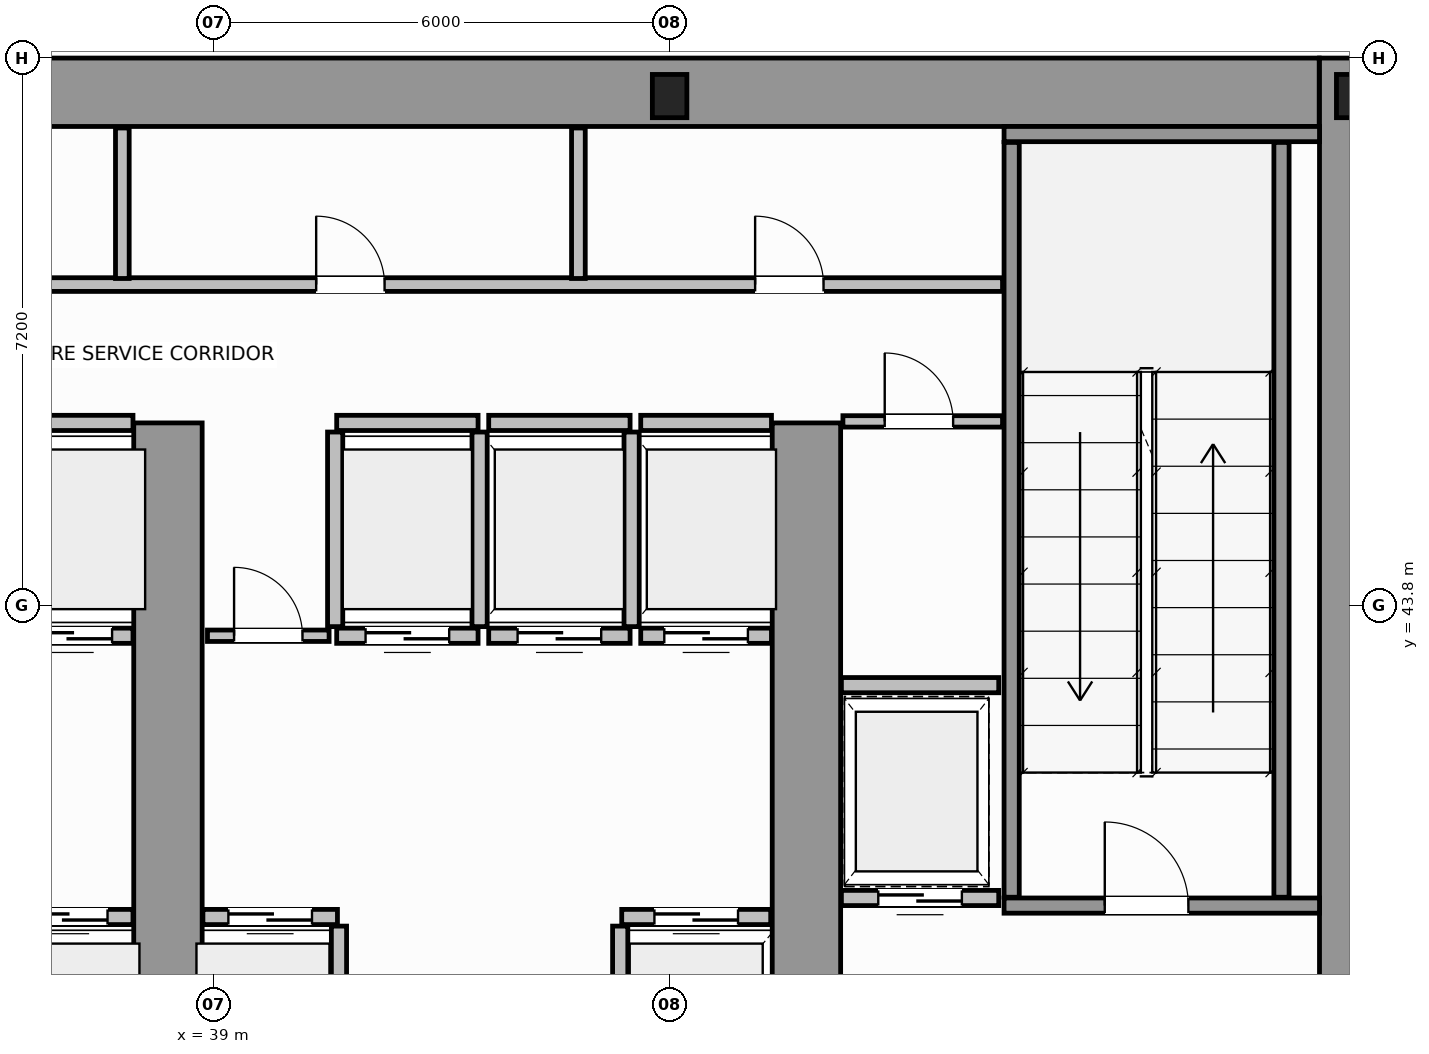
"""IFC4 building model, lengths in metres.
Left out: names, types, materials, properties, quantities, classifications, styles, units other than length and angle.
Written with IfcOpenShell. Run it as: python <this file> out.ifc"""

import sys

from ifc_helpers import new_model, si_unit, direction, frame, frame_2d, origin, origin_2d, place, context, subcontext, project, spatial, rectangle, i_section, extrude, source, transform, mapped, element, fill, save


model = new_model("IFC4")
c1 = context("Model", 3, precision=1e-05, world=origin(), true_north=direction((0.0, 1.0)))
c2 = subcontext(c1, "Body", "Model", "MODEL_VIEW")
j1 = project(units=[si_unit("LENGTHUNIT", "METRE"), si_unit("PLANEANGLEUNIT", "RADIAN")], contexts=[c1])
p1 = place(None, origin())
s1 = spatial("IfcSite", under=j1, at=p1, CompositionType="ELEMENT")
p2 = place(p1, origin())
s2 = spatial("IfcBuilding", under=s1, at=p2, CompositionType="ELEMENT")
p3 = place(p2, origin())
s3 = spatial("IfcBuildingStorey", under=s2, at=p3, CompositionType="ELEMENT", Elevation=0.0)
m1 = source(origin(), c2, "Body", "SweptSolid", [
    extrude(i_section(OverallWidth=0.454, OverallDepth=0.569, WebThickness=0.078, FlangeThickness=0.08, FilletRadius=0.015, at=origin_2d()), origin(), (0.0, 0.0, 1.0), 5.6),
])
for number, where, z_axis, x_axis in (
    (1, (45.0, 50.5, 0.0), (0.0, 0.0, 1.0), (1.0, 0.0, 0.0)),
    (2, (54.0, 50.5, 0.0), (0.0, 0.0, 1.0), (1.0, 0.0, 0.0)),
):
    element("IfcColumn", number, at=place(p3, frame(where, z_axis=z_axis, x_axis=x_axis)), inside=s3, PredefinedType="COLUMN", context=c2, shape_type="MappedRepresentation", body=[
        mapped(m1, transform((0.0, 0.0, 0.0), scale=1.0)),
    ])
p4 = place(p3, frame((34.002, 50.55, 0.0), z_axis=(0.0, 0.0, 1.0), x_axis=(1.0, 0.0, 0.0)))
e3 = element("IfcWall", 3, at=p4, inside=s3, PredefinedType="SHEAR", context=c2, shape_type="SweptSolid", body=[
    extrude(rectangle(XDim=19.544, YDim=0.9, at=frame_2d((9.772, 0.0))), origin(), (0.0, 0.0, 1.0), 5.6),
])
p5 = place(p3, frame((54.0, 36.5, 0.0), z_axis=(0.0, 0.0, 1.0), x_axis=(0.0, 1.0, 0.0)))
e4 = element("IfcWall", 4, at=p5, inside=s3, PredefinedType="SHEAR", context=c2, shape_type="SweptSolid", body=[
    extrude(rectangle(XDim=14.5, YDim=0.9, at=frame_2d((7.25, 0.0))), origin(), (0.0, 0.0, 1.0), 5.6),
])
for number, where, z_axis, x_axis in (
    (5, (38.4, 36.97, 0.0), (0.0, 0.0, 1.0), (0.0, 1.0, 0.0)),
    (6, (46.8, 36.97, 0.0), (0.0, 0.0, 1.0), (0.0, 1.0, 0.0)),
):
    element("IfcWall", number, at=place(p3, frame(where, z_axis=z_axis, x_axis=x_axis)), inside=s3, PredefinedType="SHEAR", context=c2, shape_type="SweptSolid", body=[
        extrude(rectangle(XDim=9.23, YDim=0.9, at=frame_2d((4.615, 0.0))), origin(), (0.0, 0.0, 1.0), 5.6),
    ])
p6 = place(p3, frame((49.4, 39.85, 0.0), z_axis=(0.0, 0.0, 1.0), x_axis=(1.0, 0.0, 0.0)))
e7 = element("IfcWall", 7, at=p6, inside=s3, PredefinedType="SOLIDWALL", context=c2, shape_type="SweptSolid", body=[
    extrude(rectangle(XDim=4.15, YDim=0.2, at=frame_2d((2.075, 0.0))), origin(), (0.0, 0.0, 1.0), 5.6),
])
p7 = place(p6, frame((1.325, 0.0, 0.0)))
e8 = element("IfcOpeningElement", 8, at=p7, cuts=e7, PredefinedType="OPENING", context=c2, shape_type="SweptSolid", body=[
    extrude(rectangle(XDim=1.1, YDim=2.15, at=frame_2d((0.55, 1.075))), frame((0.0, 0.11, 0.0), z_axis=(0.0, -1.0, 0.0), x_axis=(1.0, 0.0, 0.0)), (0.0, 0.0, 1.0), 0.22),
])
p8 = place(p3, frame((49.4, 50.0, 0.0), z_axis=(0.0, 0.0, 1.0), x_axis=(1.0, 0.0, 0.0)))
e9 = element("IfcWall", 9, at=p8, inside=s3, PredefinedType="SOLIDWALL", context=c2, shape_type="SweptSolid", body=[
    extrude(rectangle(XDim=4.15, YDim=0.2, at=frame_2d((2.075, 0.0))), origin(), (0.0, 0.0, 1.0), 5.6),
])
for number, where, z_axis, x_axis in (
    (10, (49.5, 39.96, 0.0), (0.0, 0.0, 1.0), (0.0, 1.0, 0.0)),
    (11, (53.05, 39.96, 0.0), (0.0, 0.0, 1.0), (0.0, 1.0, 0.0)),
):
    element("IfcWall", number, at=place(p3, frame(where, z_axis=z_axis, x_axis=x_axis)), inside=s3, PredefinedType="SOLIDWALL", context=c2, shape_type="SweptSolid", body=[
        extrude(rectangle(XDim=9.93, YDim=0.2, at=frame_2d((4.965, 0.0))), origin(), (0.0, 0.0, 1.0), 5.6),
    ])
p9 = place(p3, frame((36.17, 39.7, 0.0), z_axis=(0.0, 0.0, 1.0), x_axis=(1.0, 0.0, 0.0)))
e12 = element("IfcWall", 12, at=p9, inside=s3, PredefinedType="SOLIDWALL", context=c2, shape_type="SweptSolid", body=[
    extrude(rectangle(XDim=1.77, YDim=0.2, at=frame_2d((0.885, 0.0))), origin(), (0.0, 0.0, 1.0), 5.32),
])
p10 = place(p9, frame((0.335, 0.0, 0.0)))
e13 = element("IfcOpeningElement", 13, at=p10, cuts=e12, PredefinedType="OPENING", context=c2, shape_type="SweptSolid", body=[
    extrude(rectangle(XDim=1.1, YDim=2.15, at=frame_2d((0.55, 1.075))), frame((0.0, 0.11, 0.0), z_axis=(0.0, -1.0, 0.0), x_axis=(1.0, 0.0, 0.0)), (0.0, 0.0, 1.0), 0.22),
])
p11 = place(p3, frame((36.29, 43.4, 0.0), z_axis=(0.0, 0.0, 1.0), x_axis=(1.0, 0.0, 0.0)))
e14 = element("IfcWall", 14, at=p11, inside=s3, PredefinedType="SOLIDWALL", context=c2, shape_type="SweptSolid", body=[
    extrude(rectangle(XDim=1.65, YDim=0.2, at=frame_2d((0.825, 0.0))), origin(), (0.0, 0.0, 1.0), 5.32),
])
p12 = place(p11, frame((0.275, 0.0, 0.0)))
e15 = element("IfcOpeningElement", 15, at=p12, cuts=e14, PredefinedType="OPENING", context=c2, shape_type="SweptSolid", body=[
    extrude(rectangle(XDim=1.1, YDim=2.15, at=frame_2d((0.55, 1.075))), frame((0.0, 0.11, 0.0), z_axis=(0.0, -1.0, 0.0), x_axis=(1.0, 0.0, 0.0)), (0.0, 0.0, 1.0), 0.22),
])
p13 = place(p3, frame((36.29, 46.2, 0.0), z_axis=(0.0, 0.0, 1.0), x_axis=(1.0, 0.0, 0.0)))
e16 = element("IfcWall", 16, at=p13, inside=s3, PredefinedType="SOLIDWALL", context=c2, shape_type="SweptSolid", body=[
    extrude(rectangle(XDim=1.65, YDim=0.2, at=frame_2d((0.825, 0.0))), origin(), (0.0, 0.0, 1.0), 5.32),
])
p14 = place(p3, frame((38.86, 39.7, 0.0), z_axis=(0.0, 0.0, 1.0), x_axis=(1.0, 0.0, 0.0)))
e17 = element("IfcWall", 17, at=p14, inside=s3, PredefinedType="SOLIDWALL", context=c2, shape_type="SweptSolid", body=[
    extrude(rectangle(XDim=1.77, YDim=0.2, at=frame_2d((0.885, 0.0))), origin(), (0.0, 0.0, 1.0), 5.32),
])
p15 = place(p14, frame((0.335, 0.0, 0.0)))
e18 = element("IfcOpeningElement", 18, at=p15, cuts=e17, PredefinedType="OPENING", context=c2, shape_type="SweptSolid", body=[
    extrude(rectangle(XDim=1.1, YDim=2.15, at=frame_2d((0.55, 1.075))), frame((0.0, 0.11, 0.0), z_axis=(0.0, -1.0, 0.0), x_axis=(1.0, 0.0, 0.0)), (0.0, 0.0, 1.0), 0.22),
])
p16 = place(p3, frame((40.65, 37.02, 0.0), z_axis=(0.0, 0.0, 1.0), x_axis=(0.0, 1.0, 0.0)))
e19 = element("IfcWall", 19, at=p16, inside=s3, PredefinedType="SOLIDWALL", context=c2, shape_type="SweptSolid", body=[
    extrude(rectangle(XDim=2.56, YDim=0.2, at=frame_2d((1.28, 0.0))), origin(), (0.0, 0.0, 1.0), 5.32),
])
p17 = place(p3, frame((44.37, 39.7, 0.0), z_axis=(0.0, 0.0, 1.0), x_axis=(1.0, 0.0, 0.0)))
e20 = element("IfcWall", 20, at=p17, inside=s3, PredefinedType="SOLIDWALL", context=c2, shape_type="SweptSolid", body=[
    extrude(rectangle(XDim=1.96, YDim=0.2, at=frame_2d((0.98, 0.0))), origin(), (0.0, 0.0, 1.0), 5.32),
])
p18 = place(p17, frame((0.43, 0.0, 0.0)))
e21 = element("IfcOpeningElement", 21, at=p18, cuts=e20, PredefinedType="OPENING", context=c2, shape_type="SweptSolid", body=[
    extrude(rectangle(XDim=1.1, YDim=2.15, at=frame_2d((0.55, 1.075))), frame((0.0, 0.11, 0.0), z_axis=(0.0, -1.0, 0.0), x_axis=(1.0, 0.0, 0.0)), (0.0, 0.0, 1.0), 0.22),
])
p19 = place(p3, frame((44.35, 37.02, 0.0), z_axis=(0.0, 0.0, 1.0), x_axis=(0.0, 1.0, 0.0)))
e22 = element("IfcWall", 22, at=p19, inside=s3, PredefinedType="SOLIDWALL", context=c2, shape_type="SweptSolid", body=[
    extrude(rectangle(XDim=2.56, YDim=0.2, at=frame_2d((1.28, 0.0))), origin(), (0.0, 0.0, 1.0), 5.32),
])
p20 = place(p3, frame((40.62, 43.4, 0.0), z_axis=(0.0, 0.0, 1.0), x_axis=(1.0, 0.0, 0.0)))
e23 = element("IfcWall", 23, at=p20, inside=s3, PredefinedType="SOLIDWALL", context=c2, shape_type="SweptSolid", body=[
    extrude(rectangle(XDim=1.86, YDim=0.2, at=frame_2d((0.93, 0.0))), origin(), (0.0, 0.0, 1.0), 5.32),
])
p21 = place(p20, frame((0.38, 0.0, 0.0)))
e24 = element("IfcOpeningElement", 24, at=p21, cuts=e23, PredefinedType="OPENING", context=c2, shape_type="SweptSolid", body=[
    extrude(rectangle(XDim=1.1, YDim=2.15, at=frame_2d((0.55, 1.075))), frame((0.0, 0.11, 0.0), z_axis=(0.0, -1.0, 0.0), x_axis=(1.0, 0.0, 0.0)), (0.0, 0.0, 1.0), 0.22),
])
p22 = place(p3, frame((40.62, 46.2, 0.0), z_axis=(0.0, 0.0, 1.0), x_axis=(1.0, 0.0, 0.0)))
e25 = element("IfcWall", 25, at=p22, inside=s3, PredefinedType="SOLIDWALL", context=c2, shape_type="SweptSolid", body=[
    extrude(rectangle(XDim=1.86, YDim=0.2, at=frame_2d((0.93, 0.0))), origin(), (0.0, 0.0, 1.0), 5.32),
])
for number, where, z_axis, x_axis in (
    (26, (40.6, 43.52, 0.0), (0.0, 0.0, 1.0), (0.0, 1.0, 0.0)),
    (27, (42.5, 43.52, 0.0), (0.0, 0.0, 1.0), (0.0, 1.0, 0.0)),
):
    element("IfcWall", number, at=place(p3, frame(where, z_axis=z_axis, x_axis=x_axis)), inside=s3, PredefinedType="SOLIDWALL", context=c2, shape_type="SweptSolid", body=[
        extrude(rectangle(XDim=2.56, YDim=0.2, at=frame_2d((1.28, 0.0))), origin(), (0.0, 0.0, 1.0), 5.32),
    ])
p23 = place(p3, frame((42.62, 43.4, 0.0), z_axis=(0.0, 0.0, 1.0), x_axis=(1.0, 0.0, 0.0)))
e28 = element("IfcWall", 28, at=p23, inside=s3, PredefinedType="SOLIDWALL", context=c2, shape_type="SweptSolid", body=[
    extrude(rectangle(XDim=1.86, YDim=0.2, at=frame_2d((0.93, 0.0))), origin(), (0.0, 0.0, 1.0), 5.32),
])
p24 = place(p23, frame((0.38, 0.0, 0.0)))
e29 = element("IfcOpeningElement", 29, at=p24, cuts=e28, PredefinedType="OPENING", context=c2, shape_type="SweptSolid", body=[
    extrude(rectangle(XDim=1.1, YDim=2.15, at=frame_2d((0.55, 1.075))), frame((0.0, 0.11, 0.0), z_axis=(0.0, -1.0, 0.0), x_axis=(1.0, 0.0, 0.0)), (0.0, 0.0, 1.0), 0.22),
])
p25 = place(p3, frame((42.62, 46.2, 0.0), z_axis=(0.0, 0.0, 1.0), x_axis=(1.0, 0.0, 0.0)))
e30 = element("IfcWall", 30, at=p25, inside=s3, PredefinedType="SOLIDWALL", context=c2, shape_type="SweptSolid", body=[
    extrude(rectangle(XDim=1.86, YDim=0.2, at=frame_2d((0.93, 0.0))), origin(), (0.0, 0.0, 1.0), 5.32),
])
p26 = place(p3, frame((44.5, 43.52, 0.0), z_axis=(0.0, 0.0, 1.0), x_axis=(0.0, 1.0, 0.0)))
e31 = element("IfcWall", 31, at=p26, inside=s3, PredefinedType="SOLIDWALL", context=c2, shape_type="SweptSolid", body=[
    extrude(rectangle(XDim=2.56, YDim=0.2, at=frame_2d((1.28, 0.0))), origin(), (0.0, 0.0, 1.0), 5.32),
])
p27 = place(p3, frame((44.62, 43.4, 0.0), z_axis=(0.0, 0.0, 1.0), x_axis=(1.0, 0.0, 0.0)))
e32 = element("IfcWall", 32, at=p27, inside=s3, PredefinedType="SOLIDWALL", context=c2, shape_type="SweptSolid", body=[
    extrude(rectangle(XDim=1.72, YDim=0.2, at=frame_2d((0.86, 0.0))), origin(), (0.0, 0.0, 1.0), 5.32),
])
p28 = place(p27, frame((0.31, 0.0, 0.0)))
e33 = element("IfcOpeningElement", 33, at=p28, cuts=e32, PredefinedType="OPENING", context=c2, shape_type="SweptSolid", body=[
    extrude(rectangle(XDim=1.1, YDim=2.15, at=frame_2d((0.55, 1.075))), frame((0.0, 0.11, 0.0), z_axis=(0.0, -1.0, 0.0), x_axis=(1.0, 0.0, 0.0)), (0.0, 0.0, 1.0), 0.22),
])
p29 = place(p3, frame((44.62, 46.2, 0.0), z_axis=(0.0, 0.0, 1.0), x_axis=(1.0, 0.0, 0.0)))
e34 = element("IfcWall", 34, at=p29, inside=s3, PredefinedType="SOLIDWALL", context=c2, shape_type="SweptSolid", body=[
    extrude(rectangle(XDim=1.72, YDim=0.2, at=frame_2d((0.86, 0.0))), origin(), (0.0, 0.0, 1.0), 5.32),
])
p30 = place(p3, frame((47.26, 39.95, 0.0), z_axis=(0.0, 0.0, 1.0), x_axis=(1.0, 0.0, 0.0)))
e35 = element("IfcWall", 35, at=p30, inside=s3, PredefinedType="SOLIDWALL", context=c2, shape_type="SweptSolid", body=[
    extrude(rectangle(XDim=2.07, YDim=0.2, at=frame_2d((1.035, 0.0))), origin(), (0.0, 0.0, 1.0), 5.32),
])
p31 = place(p30, frame((0.485, 0.0, 0.0)))
e36 = element("IfcOpeningElement", 36, at=p31, cuts=e35, PredefinedType="OPENING", context=c2, shape_type="SweptSolid", body=[
    extrude(rectangle(XDim=1.1, YDim=2.15, at=frame_2d((0.55, 1.075))), frame((0.0, 0.11, 0.0), z_axis=(0.0, -1.0, 0.0), x_axis=(1.0, 0.0, 0.0)), (0.0, 0.0, 1.0), 0.22),
])
p32 = place(p3, frame((47.26, 42.75, 0.0), z_axis=(0.0, 0.0, 1.0), x_axis=(1.0, 0.0, 0.0)))
e37 = element("IfcWall", 37, at=p32, inside=s3, PredefinedType="SOLIDWALL", context=c2, shape_type="SweptSolid", body=[
    extrude(rectangle(XDim=2.07, YDim=0.2, at=frame_2d((1.035, 0.0))), origin(), (0.0, 0.0, 1.0), 5.32),
])
p33 = place(p3, frame((47.28, 46.22, 0.0), z_axis=(0.0, 0.0, 1.0), x_axis=(1.0, 0.0, 0.0)))
e38 = element("IfcWall", 38, at=p33, inside=s3, PredefinedType="PARTITIONING", context=c2, shape_type="SweptSolid", body=[
    extrude(rectangle(XDim=2.1, YDim=0.15, at=frame_2d((1.05, 0.0))), origin(), (0.0, 0.0, 1.0), 5.32),
])
p34 = place(p33, frame((0.55, 0.0, 0.0)))
e39 = element("IfcOpeningElement", 39, at=p34, cuts=e38, PredefinedType="OPENING", context=c2, shape_type="SweptSolid", body=[
    extrude(rectangle(XDim=0.9, YDim=2.1, at=frame_2d((0.45, 1.05))), frame((0.0, 0.085, 0.0), z_axis=(0.0, -1.0, 0.0), x_axis=(1.0, 0.0, 0.0)), (0.0, 0.0, 1.0), 0.17),
])
p35 = place(p3, frame((38.92, 43.4, 0.0), z_axis=(0.0, 0.0, 1.0), x_axis=(1.0, 0.0, 0.0)))
e40 = element("IfcWall", 40, at=p35, inside=s3, PredefinedType="PARTITIONING", context=c2, shape_type="SweptSolid", body=[
    extrude(rectangle(XDim=1.6, YDim=0.15, at=frame_2d((0.8, 0.0))), origin(), (0.0, 0.0, 1.0), 5.32),
])
p36 = place(p35, frame((0.35, 0.0, 0.0)))
e41 = element("IfcOpeningElement", 41, at=p36, cuts=e40, PredefinedType="OPENING", context=c2, shape_type="SweptSolid", body=[
    extrude(rectangle(XDim=0.9, YDim=2.1, at=frame_2d((0.45, 1.05))), frame((0.0, 0.085, 0.0), z_axis=(0.0, -1.0, 0.0), x_axis=(1.0, 0.0, 0.0)), (0.0, 0.0, 1.0), 0.17),
])
p37 = place(p3, frame((18.62, 48.02, 0.0), z_axis=(0.0, 0.0, 1.0), x_axis=(1.0, 0.0, 0.0)))
e42 = element("IfcWall", 42, at=p37, inside=s3, PredefinedType="PLUMBINGWALL", context=c2, shape_type="SweptSolid", body=[
    extrude(rectangle(XDim=30.76, YDim=0.18, at=frame_2d((15.38, 0.0))), origin(), (0.0, 0.0, 1.0), 5.32),
])
p38 = place(p37, frame((1.655, 0.0, 0.0)))
e43 = element("IfcOpeningElement", 43, at=p38, cuts=e42, PredefinedType="OPENING", context=c2, shape_type="SweptSolid", body=[
    extrude(rectangle(XDim=0.9, YDim=2.15, at=frame_2d((0.45, 1.075))), frame((0.0, 0.1, 0.0), z_axis=(0.0, -1.0, 0.0), x_axis=(1.0, 0.0, 0.0)), (0.0, 0.0, 1.0), 0.2),
])
p39 = place(p37, frame((6.03, 0.0, 0.0)))
e44 = element("IfcOpeningElement", 44, at=p39, cuts=e42, PredefinedType="OPENING", context=c2, shape_type="SweptSolid", body=[
    extrude(rectangle(XDim=0.9, YDim=2.15, at=frame_2d((0.45, 1.075))), frame((0.0, 0.1, 0.0), z_axis=(0.0, -1.0, 0.0), x_axis=(1.0, 0.0, 0.0)), (0.0, 0.0, 1.0), 0.2),
])
p40 = place(p37, frame((10.93, 0.0, 0.0)))
e45 = element("IfcOpeningElement", 45, at=p40, cuts=e42, PredefinedType="OPENING", context=c2, shape_type="SweptSolid", body=[
    extrude(rectangle(XDim=0.9, YDim=2.15, at=frame_2d((0.45, 1.075))), frame((0.0, 0.1, 0.0), z_axis=(0.0, -1.0, 0.0), x_axis=(1.0, 0.0, 0.0)), (0.0, 0.0, 1.0), 0.2),
])
p41 = place(p37, frame((16.13, 0.0, 0.0)))
e46 = element("IfcOpeningElement", 46, at=p41, cuts=e42, PredefinedType="OPENING", context=c2, shape_type="SweptSolid", body=[
    extrude(rectangle(XDim=0.9, YDim=2.15, at=frame_2d((0.45, 1.075))), frame((0.0, 0.1, 0.0), z_axis=(0.0, -1.0, 0.0), x_axis=(1.0, 0.0, 0.0)), (0.0, 0.0, 1.0), 0.2),
])
p42 = place(p37, frame((21.73, 0.0, 0.0)))
e47 = element("IfcOpeningElement", 47, at=p42, cuts=e42, PredefinedType="OPENING", context=c2, shape_type="SweptSolid", body=[
    extrude(rectangle(XDim=0.9, YDim=2.15, at=frame_2d((0.45, 1.075))), frame((0.0, 0.1, 0.0), z_axis=(0.0, -1.0, 0.0), x_axis=(1.0, 0.0, 0.0)), (0.0, 0.0, 1.0), 0.2),
])
p43 = place(p37, frame((27.505, 0.0, 0.0)))
e48 = element("IfcOpeningElement", 48, at=p43, cuts=e42, PredefinedType="OPENING", context=c2, shape_type="SweptSolid", body=[
    extrude(rectangle(XDim=0.9, YDim=2.15, at=frame_2d((0.45, 1.075))), frame((0.0, 0.1, 0.0), z_axis=(0.0, -1.0, 0.0), x_axis=(1.0, 0.0, 0.0)), (0.0, 0.0, 1.0), 0.2),
])
for number, where, z_axis, x_axis in (
    (49, (37.8, 48.1, 0.0), (0.0, 0.0, 1.0), (0.0, 1.0, 0.0)),
    (50, (43.8, 48.1, 0.0), (0.0, 0.0, 1.0), (0.0, 1.0, 0.0)),
):
    element("IfcWall", number, at=place(p3, frame(where, z_axis=z_axis, x_axis=x_axis)), inside=s3, PredefinedType="PLUMBINGWALL", context=c2, shape_type="SweptSolid", body=[
        extrude(rectangle(XDim=1.98, YDim=0.18, at=frame_2d((0.99, 0.0))), origin(), (0.0, 0.0, 1.0), 5.32),
    ])
m2 = source(origin(), c2, "Body", "SweptSolid", [
    extrude(rectangle(XDim=1.1, YDim=2.15, at=frame_2d((0.55, 1.075))), frame((0.0, 0.025, 0.0), z_axis=(0.0, -1.0, 0.0), x_axis=(1.0, 0.0, 0.0)), (0.0, 0.0, 1.0), 0.05),
])
p44 = place(p7, origin())
e51 = element("IfcDoor", 51, at=p44, inside=s3, OperationType="SINGLE_SWING_RIGHT", PredefinedType="DOOR", context=c2, shape_type="MappedRepresentation", body=[
    mapped(m2, transform((0.0, 0.0, 0.0), scale=1.0)),
])
fill(e8, e51)
p45 = place(p10, origin())
e52 = element("IfcDoor", 52, at=p45, inside=s3, OperationType="DOUBLE_DOOR_SLIDING", PredefinedType="DOOR", context=c2, shape_type="MappedRepresentation", body=[
    mapped(m2, transform((0.0, 0.0, 0.0), scale=1.0)),
])
fill(e13, e52)
p46 = place(p12, origin())
e53 = element("IfcDoor", 53, at=p46, inside=s3, OperationType="DOUBLE_DOOR_SLIDING", PredefinedType="DOOR", context=c2, shape_type="MappedRepresentation", body=[
    mapped(m2, transform((0.0, 0.0, 0.0), scale=1.0)),
])
fill(e15, e53)
p47 = place(p15, origin())
e54 = element("IfcDoor", 54, at=p47, inside=s3, OperationType="DOUBLE_DOOR_SLIDING", PredefinedType="DOOR", context=c2, shape_type="MappedRepresentation", body=[
    mapped(m2, transform((0.0, 0.0, 0.0), scale=1.0)),
])
fill(e18, e54)
p48 = place(p18, origin())
e55 = element("IfcDoor", 55, at=p48, inside=s3, OperationType="DOUBLE_DOOR_SLIDING", PredefinedType="DOOR", context=c2, shape_type="MappedRepresentation", body=[
    mapped(m2, transform((0.0, 0.0, 0.0), scale=1.0)),
])
fill(e21, e55)
p49 = place(p21, origin())
e56 = element("IfcDoor", 56, at=p49, inside=s3, OperationType="DOUBLE_DOOR_SLIDING", PredefinedType="DOOR", context=c2, shape_type="MappedRepresentation", body=[
    mapped(m2, transform((0.0, 0.0, 0.0), scale=1.0)),
])
fill(e24, e56)
p50 = place(p24, origin())
e57 = element("IfcDoor", 57, at=p50, inside=s3, OperationType="DOUBLE_DOOR_SLIDING", PredefinedType="DOOR", context=c2, shape_type="MappedRepresentation", body=[
    mapped(m2, transform((0.0, 0.0, 0.0), scale=1.0)),
])
fill(e29, e57)
p51 = place(p28, origin())
e58 = element("IfcDoor", 58, at=p51, inside=s3, OperationType="DOUBLE_DOOR_SLIDING", PredefinedType="DOOR", context=c2, shape_type="MappedRepresentation", body=[
    mapped(m2, transform((0.0, 0.0, 0.0), scale=1.0)),
])
fill(e33, e58)
p52 = place(p31, origin())
e59 = element("IfcDoor", 59, at=p52, inside=s3, OperationType="DOUBLE_DOOR_SLIDING", PredefinedType="DOOR", context=c2, shape_type="MappedRepresentation", body=[
    mapped(m2, transform((0.0, 0.0, 0.0), scale=1.0)),
])
fill(e36, e59)
m3 = source(origin(), c2, "Body", "SweptSolid", [
    extrude(rectangle(XDim=0.9, YDim=2.1, at=frame_2d((0.45, 1.05))), frame((0.0, 0.025, 0.0), z_axis=(0.0, -1.0, 0.0), x_axis=(1.0, 0.0, 0.0)), (0.0, 0.0, 1.0), 0.05),
])
p53 = place(p34, origin())
e60 = element("IfcDoor", 60, at=p53, inside=s3, OperationType="SINGLE_SWING_RIGHT", PredefinedType="DOOR", context=c2, shape_type="MappedRepresentation", body=[
    mapped(m3, transform((0.0, 0.0, 0.0), scale=1.0)),
])
fill(e39, e60)
p54 = place(p36, origin())
e61 = element("IfcDoor", 61, at=p54, inside=s3, OperationType="SINGLE_SWING_LEFT", PredefinedType="DOOR", context=c2, shape_type="MappedRepresentation", body=[
    mapped(m3, transform((0.0, 0.0, 0.0), scale=1.0)),
])
fill(e41, e61)
m4 = source(origin(), c2, "Body", "SweptSolid", [
    extrude(rectangle(XDim=0.9, YDim=2.15, at=frame_2d((0.45, 1.075))), frame((0.0, 0.025, 0.0), z_axis=(0.0, -1.0, 0.0), x_axis=(1.0, 0.0, 0.0)), (0.0, 0.0, 1.0), 0.05),
])
p55 = place(p42, origin())
e62 = element("IfcDoor", 62, at=p55, inside=s3, OperationType="SINGLE_SWING_LEFT", PredefinedType="DOOR", context=c2, shape_type="MappedRepresentation", body=[
    mapped(m4, transform((0.0, 0.0, 0.0), scale=1.0)),
])
fill(e47, e62)
p56 = place(p43, origin())
e63 = element("IfcDoor", 63, at=p56, inside=s3, OperationType="SINGLE_SWING_RIGHT", PredefinedType="DOOR", context=c2, shape_type="MappedRepresentation", body=[
    mapped(m4, transform((0.0, 0.0, 0.0), scale=1.0)),
])
fill(e48, e63)
save(model, sys.argv[1])
